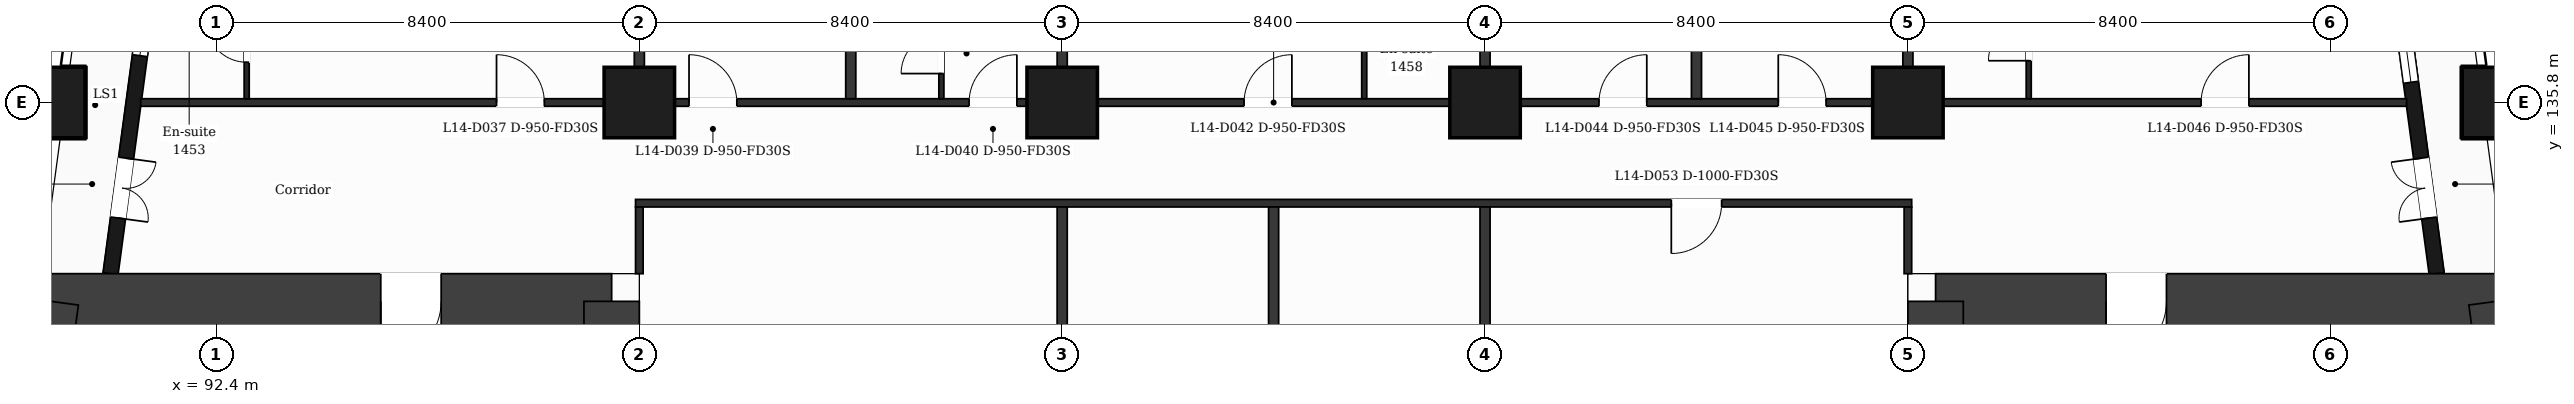
"""IFC4 building model, lengths in metres.
Left out: names, types, materials, properties, quantities, classifications, styles, units other than length and angle.
Written with IfcOpenShell. Run it as: python <this file> out.ifc"""

import sys

from ifc_helpers import new_model, si_unit, direction, frame, frame_2d, origin, origin_2d, place, context, subcontext, project, spatial, rectangle, extrude, element, fill, save


model = new_model("IFC4")
c1 = context("Model", 3, precision=1e-05, world=origin(), true_north=direction((0.0, 1.0)))
c2 = subcontext(c1, "Body", "Model", "MODEL_VIEW")
j1 = project(units=[si_unit("LENGTHUNIT", "METRE"), si_unit("PLANEANGLEUNIT", "RADIAN")], contexts=[c1])
p1 = place(None, origin())
s1 = spatial("IfcSite", under=j1, at=p1, CompositionType="ELEMENT")
p2 = place(p1, origin())
s2 = spatial("IfcBuilding", under=s1, at=p2, CompositionType="ELEMENT")
p3 = place(p2, frame((0.0, 0.0, 67.0)))
s3 = spatial("IfcBuildingStorey", under=s2, at=p3, CompositionType="ELEMENT", Elevation=67.0)
p4 = place(p3, frame((89.112, 131.85, 0.0), z_axis=(0.0, 0.0, 1.0), x_axis=(1.0, 0.0, 0.0)))
e1 = element("IfcWall", 1, at=p4, inside=s3, PredefinedType="SHEAR", context=c2, shape_type="SweptSolid", body=[
    extrude(rectangle(XDim=11.138, YDim=1.1, at=frame_2d((5.569, 0.0))), origin(), (0.0, 0.0, 1.0), 3.5),
])
p5 = place(p4, frame((6.552, 0.0, 0.0)))
e2 = element("IfcOpeningElement", 2, at=p5, cuts=e1, PredefinedType="OPENING", context=c2, shape_type="SweptSolid", body=[
    extrude(rectangle(XDim=1.2, YDim=2.1, at=frame_2d((0.6, 1.05))), frame((0.0, 0.56, 0.0), z_axis=(0.0, -1.0, 0.0), x_axis=(1.0, 0.0, 0.0)), (0.0, 0.0, 1.0), 1.12),
])
p6 = place(p3, frame((100.25, 131.85, 0.0), z_axis=(0.0, 0.0, 1.0), x_axis=(0.0, -1.0, 0.0)))
e3 = element("IfcWall", 3, at=p6, inside=s3, PredefinedType="SHEAR", context=c2, shape_type="SweptSolid", body=[
    extrude(rectangle(XDim=20.9, YDim=1.1, at=frame_2d((10.45, 0.0))), origin(), (0.0, 0.0, 1.0), 3.5),
])
p7 = place(p3, frame((86.298, 110.95, 0.0), z_axis=(0.0, 0.0, 1.0), x_axis=(0.133400422634, 0.99106222168, 0.0)))
e4 = element("IfcWall", 4, at=p7, inside=s3, PredefinedType="SHEAR", context=c2, shape_type="SweptSolid", body=[
    extrude(rectangle(XDim=21.089, YDim=1.1, at=frame_2d((10.544, 0.0))), origin(), (0.0, 0.0, 1.0), 3.5),
])
p8 = place(p3, frame((126.55, 131.85, 0.0), z_axis=(0.0, 0.0, 1.0), x_axis=(1.0, 0.0, 0.0)))
e5 = element("IfcWall", 5, at=p8, inside=s3, PredefinedType="SHEAR", context=c2, shape_type="SweptSolid", body=[
    extrude(rectangle(XDim=11.138, YDim=1.1, at=frame_2d((5.569, 0.0))), origin(), (0.0, 0.0, 1.0), 3.5),
])
p9 = place(p8, frame((3.386, 0.0, 0.0)))
e6 = element("IfcOpeningElement", 6, at=p9, cuts=e5, PredefinedType="OPENING", context=c2, shape_type="SweptSolid", body=[
    extrude(rectangle(XDim=1.2, YDim=2.1, at=frame_2d((0.6, 1.05))), frame((0.0, 0.56, 0.0), z_axis=(0.0, -1.0, 0.0), x_axis=(1.0, 0.0, 0.0)), (0.0, 0.0, 1.0), 1.12),
])
p10 = place(p3, frame((137.688, 131.85, 0.0), z_axis=(0.0, 0.0, 1.0), x_axis=(0.133411793472, -0.991060691059, 0.0)))
e7 = element("IfcWall", 7, at=p10, inside=s3, PredefinedType="SHEAR", context=c2, shape_type="SweptSolid", body=[
    extrude(rectangle(XDim=21.089, YDim=1.1, at=frame_2d((10.544, 0.0))), origin(), (0.0, 0.0, 1.0), 3.5),
])
p11 = place(p3, frame((126.55, 110.95, 0.0), z_axis=(0.0, 0.0, 1.0), x_axis=(0.0, 1.0, 0.0)))
e8 = element("IfcWall", 8, at=p11, inside=s3, PredefinedType="SHEAR", context=c2, shape_type="SweptSolid", body=[
    extrude(rectangle(XDim=20.9, YDim=1.1, at=frame_2d((10.45, 0.0))), origin(), (0.0, 0.0, 1.0), 3.5),
])
for number, where, z_axis, x_axis in (
    (9, (100.8, 135.8, 0.0), (0.0, 0.0, 1.0), (1.0, 0.0, 0.0)),
    (10, (109.2, 135.8, 0.0), (0.0, 0.0, 1.0), (1.0, 0.0, 0.0)),
    (11, (117.6, 135.8, 0.0), (0.0, 0.0, 1.0), (1.0, 0.0, 0.0)),
    (12, (126.0, 135.8, 0.0), (0.0, 0.0, 1.0), (1.0, 0.0, 0.0)),
    (13, (89.088, 135.8, 0.0), (0.0, 0.0, 1.0), (1.0, 0.0, 0.0)),
    (14, (137.711, 135.8, 0.0), (0.0, 0.0, 1.0), (1.0, 0.0, 0.0)),
):
    element("IfcColumn", number, at=place(p3, frame(where, z_axis=z_axis, x_axis=x_axis)), inside=s3, PredefinedType="COLUMN", context=c2, shape_type="SweptSolid", body=[
        extrude(rectangle(XDim=1.4, YDim=1.4, at=origin_2d()), origin(), (0.0, 0.0, 1.0), 3.5),
    ])
p12 = place(p3, frame((136.504, 132.4, 0.0), z_axis=(0.0, 0.0, 1.0), x_axis=(-0.133399697462, 0.99106231929, 0.0)))
e15 = element("IfcWall", 15, at=p12, inside=s3, PredefinedType="SOLIDWALL", context=c2, shape_type="SweptSolid", body=[
    extrude(rectangle(XDim=6.74, YDim=0.3, at=frame_2d((3.37, 0.0))), origin(), (0.0, 0.0, 1.0), 3.18),
])
p13 = place(p12, frame((1.115, 0.0, 0.0)))
e16 = element("IfcOpeningElement", 16, at=p13, cuts=e15, PredefinedType="OPENING", context=c2, shape_type="SweptSolid", body=[
    extrude(rectangle(XDim=1.2, YDim=2.4, at=frame_2d((0.6, 1.2))), frame((0.0, 0.16, 0.0), z_axis=(0.0, -1.0, 0.0), x_axis=(1.0, 0.0, 0.0)), (0.0, 0.0, 1.0), 0.32),
])
p14 = place(p12, frame((3.835, 0.0, 0.9)))
e17 = element("IfcOpeningElement", 17, at=p14, cuts=e15, PredefinedType="OPENING", context=c2, shape_type="SweptSolid", body=[
    extrude(rectangle(XDim=2.4, YDim=2.1, at=frame_2d((1.2, 1.05))), frame((0.0, 0.16, 0.0), z_axis=(0.0, -1.0, 0.0), x_axis=(1.0, 0.0, 0.0)), (0.0, 0.0, 1.0), 0.32),
])
p15 = place(p3, frame((91.177, 138.95, 0.0), z_axis=(0.0, 0.0, 1.0), x_axis=(-0.133426664613, -0.991058689065, 0.0)))
e18 = element("IfcWall", 18, at=p15, inside=s3, PredefinedType="SOLIDWALL", context=c2, shape_type="SweptSolid", body=[
    extrude(rectangle(XDim=6.609, YDim=0.3, at=frame_2d((3.305, 0.0))), origin(), (0.0, 0.0, 1.0), 3.18),
])
p16 = place(p15, frame((1.039, 0.0, 0.9)))
e19 = element("IfcOpeningElement", 19, at=p16, cuts=e18, PredefinedType="OPENING", context=c2, shape_type="SweptSolid", body=[
    extrude(rectangle(XDim=1.2, YDim=2.1, at=frame_2d((0.6, 1.05))), frame((0.0, 0.16, 0.0), z_axis=(0.0, -1.0, 0.0), x_axis=(1.0, 0.0, 0.0)), (0.0, 0.0, 1.0), 0.32),
])
p17 = place(p15, frame((4.294, 0.0, 0.0)))
e20 = element("IfcOpeningElement", 20, at=p17, cuts=e18, PredefinedType="OPENING", context=c2, shape_type="SweptSolid", body=[
    extrude(rectangle(XDim=1.2, YDim=2.4, at=frame_2d((0.6, 1.2))), frame((0.0, 0.16, 0.0), z_axis=(0.0, -1.0, 0.0), x_axis=(1.0, 0.0, 0.0)), (0.0, 0.0, 1.0), 0.32),
])
p18 = place(p3, frame((100.725, 133.8, 0.0), z_axis=(0.0, 0.0, 1.0), x_axis=(1.0, 0.0, 0.0)))
e21 = element("IfcWall", 21, at=p18, inside=s3, PredefinedType="PARTITIONING", context=c2, shape_type="SweptSolid", body=[
    extrude(rectangle(XDim=25.35, YDim=0.15, at=frame_2d((12.675, 0.0))), origin(), (0.0, 0.0, 1.0), 3.18),
])
p19 = place(p18, frame((20.575, 0.0, 0.0)))
e22 = element("IfcOpeningElement", 22, at=p19, cuts=e21, PredefinedType="OPENING", context=c2, shape_type="SweptSolid", body=[
    extrude(rectangle(XDim=1.0, YDim=2.1, at=frame_2d((0.5, 1.05))), frame((0.0, 0.085, 0.0), z_axis=(0.0, -1.0, 0.0), x_axis=(1.0, 0.0, 0.0)), (0.0, 0.0, 1.0), 0.17),
])
p20 = place(p3, frame((90.895, 135.8, 0.0), z_axis=(0.0, 0.0, 1.0), x_axis=(1.0, 0.0, 0.0)))
e23 = element("IfcWall", 23, at=p20, inside=s3, PredefinedType="PARTITIONING", context=c2, shape_type="SweptSolid", body=[
    extrude(rectangle(XDim=45.011, YDim=0.15, at=frame_2d((22.505, 0.0))), origin(), (0.0, 0.0, 1.0), 3.18),
])
p21 = place(p20, frame((7.068, 0.0, 0.0)))
e24 = element("IfcOpeningElement", 24, at=p21, cuts=e23, PredefinedType="OPENING", context=c2, shape_type="SweptSolid", body=[
    extrude(rectangle(XDim=0.95, YDim=2.1, at=frame_2d((0.475, 1.05))), frame((0.0, 0.085, 0.0), z_axis=(0.0, -1.0, 0.0), x_axis=(1.0, 0.0, 0.0)), (0.0, 0.0, 1.0), 0.17),
])
p22 = place(p20, frame((10.892, 0.0, 0.0)))
e25 = element("IfcOpeningElement", 25, at=p22, cuts=e23, PredefinedType="OPENING", context=c2, shape_type="SweptSolid", body=[
    extrude(rectangle(XDim=0.95, YDim=2.1, at=frame_2d((0.475, 1.05))), frame((0.0, 0.085, 0.0), z_axis=(0.0, -1.0, 0.0), x_axis=(1.0, 0.0, 0.0)), (0.0, 0.0, 1.0), 0.17),
])
p23 = place(p20, frame((16.455, 0.0, 0.0)))
e26 = element("IfcOpeningElement", 26, at=p23, cuts=e23, PredefinedType="OPENING", context=c2, shape_type="SweptSolid", body=[
    extrude(rectangle(XDim=0.95, YDim=2.1, at=frame_2d((0.475, 1.05))), frame((0.0, 0.085, 0.0), z_axis=(0.0, -1.0, 0.0), x_axis=(1.0, 0.0, 0.0)), (0.0, 0.0, 1.0), 0.17),
])
p24 = place(p20, frame((21.918, 0.0, 0.0)))
e27 = element("IfcOpeningElement", 27, at=p24, cuts=e23, PredefinedType="OPENING", context=c2, shape_type="SweptSolid", body=[
    extrude(rectangle(XDim=0.95, YDim=2.1, at=frame_2d((0.475, 1.05))), frame((0.0, 0.085, 0.0), z_axis=(0.0, -1.0, 0.0), x_axis=(1.0, 0.0, 0.0)), (0.0, 0.0, 1.0), 0.17),
])
p25 = place(p20, frame((28.969, 0.0, 0.0)))
e28 = element("IfcOpeningElement", 28, at=p25, cuts=e23, PredefinedType="OPENING", context=c2, shape_type="SweptSolid", body=[
    extrude(rectangle(XDim=0.95, YDim=2.1, at=frame_2d((0.475, 1.05))), frame((0.0, 0.085, 0.0), z_axis=(0.0, -1.0, 0.0), x_axis=(1.0, 0.0, 0.0)), (0.0, 0.0, 1.0), 0.17),
])
p26 = place(p20, frame((32.531, 0.0, 0.0)))
e29 = element("IfcOpeningElement", 29, at=p26, cuts=e23, PredefinedType="OPENING", context=c2, shape_type="SweptSolid", body=[
    extrude(rectangle(XDim=0.95, YDim=2.1, at=frame_2d((0.475, 1.05))), frame((0.0, 0.085, 0.0), z_axis=(0.0, -1.0, 0.0), x_axis=(1.0, 0.0, 0.0)), (0.0, 0.0, 1.0), 0.17),
])
p27 = place(p20, frame((40.929, 0.0, 0.0)))
e30 = element("IfcOpeningElement", 30, at=p27, cuts=e23, PredefinedType="OPENING", context=c2, shape_type="SweptSolid", body=[
    extrude(rectangle(XDim=0.95, YDim=2.1, at=frame_2d((0.475, 1.05))), frame((0.0, 0.085, 0.0), z_axis=(0.0, -1.0, 0.0), x_axis=(1.0, 0.0, 0.0)), (0.0, 0.0, 1.0), 0.17),
])
p28 = place(p3, frame((93.0, 135.875, 0.0), z_axis=(0.0, 0.0, 1.0), x_axis=(0.0, 1.0, 0.0)))
e31 = element("IfcWall", 31, at=p28, inside=s3, PredefinedType="PARTITIONING", context=c2, shape_type="SweptSolid", body=[
    extrude(rectangle(XDim=2.275, YDim=0.1, at=frame_2d((1.137, 0.0))), origin(), (0.0, 0.0, 1.0), 3.18),
])
p29 = place(p28, frame((0.725, 0.0, 0.0)))
e32 = element("IfcOpeningElement", 32, at=p29, cuts=e31, PredefinedType="OPENING", context=c2, shape_type="SweptSolid", body=[
    extrude(rectangle(XDim=0.8, YDim=2.1, at=frame_2d((0.4, 1.05))), frame((0.0, 0.06, 0.0), z_axis=(0.0, -1.0, 0.0), x_axis=(1.0, 0.0, 0.0)), (0.0, 0.0, 1.0), 0.12),
])
p30 = place(p3, frame((100.8, 135.875, 0.0), z_axis=(0.0, 0.0, 1.0), x_axis=(0.0, 1.0, 0.0)))
e33 = element("IfcWall", 33, at=p30, inside=s3, PredefinedType="PARTITIONING", context=c2, shape_type="SweptSolid", body=[
    extrude(rectangle(XDim=7.135, YDim=0.2, at=frame_2d((3.567, 0.0))), origin(), (0.0, 0.0, 1.0), 3.18),
])
p31 = place(p3, frame((100.8, 132.4, 0.0), z_axis=(0.0, 0.0, 1.0), x_axis=(0.0, 1.0, 0.0)))
e34 = element("IfcWall", 34, at=p31, inside=s3, PredefinedType="PARTITIONING", context=c2, shape_type="SweptSolid", body=[
    extrude(rectangle(XDim=1.325, YDim=0.15, at=frame_2d((0.663, 0.0))), origin(), (0.0, 0.0, 1.0), 3.18),
])
p32 = place(p3, frame((105.0, 135.875, 0.0), z_axis=(0.0, 0.0, 1.0), x_axis=(0.0, 1.0, 0.0)))
e35 = element("IfcWall", 35, at=p32, inside=s3, PredefinedType="PARTITIONING", context=c2, shape_type="SweptSolid", body=[
    extrude(rectangle(XDim=7.135, YDim=0.2, at=frame_2d((3.567, 0.0))), origin(), (0.0, 0.0, 1.0), 3.18),
])
p33 = place(p3, frame((106.8, 135.875, 0.0), z_axis=(0.0, 0.0, 1.0), x_axis=(0.0, 1.0, 0.0)))
e36 = element("IfcWall", 36, at=p33, inside=s3, PredefinedType="PARTITIONING", context=c2, shape_type="SweptSolid", body=[
    extrude(rectangle(XDim=2.275, YDim=0.1, at=frame_2d((1.137, 0.0))), origin(), (0.0, 0.0, 1.0), 3.18),
])
p34 = place(p33, frame((0.5, 0.0, 0.0)))
e37 = element("IfcOpeningElement", 37, at=p34, cuts=e36, PredefinedType="OPENING", context=c2, shape_type="SweptSolid", body=[
    extrude(rectangle(XDim=0.8, YDim=2.1, at=frame_2d((0.4, 1.05))), frame((0.0, 0.06, 0.0), z_axis=(0.0, -1.0, 0.0), x_axis=(1.0, 0.0, 0.0)), (0.0, 0.0, 1.0), 0.12),
])
p35 = place(p3, frame((109.2, 109.075, 0.0), z_axis=(0.0, 0.0, 1.0), x_axis=(0.0, 1.0, 0.0)))
e38 = element("IfcWall", 38, at=p35, inside=s3, PredefinedType="PARTITIONING", context=c2, shape_type="SweptSolid", body=[
    extrude(rectangle(XDim=24.65, YDim=0.2, at=frame_2d((12.325, 0.0))), origin(), (0.0, 0.0, 1.0), 3.18),
])
p36 = place(p3, frame((109.2, 135.875, 0.0), z_axis=(0.0, 0.0, 1.0), x_axis=(0.0, 1.0, 0.0)))
e39 = element("IfcWall", 39, at=p36, inside=s3, PredefinedType="PARTITIONING", context=c2, shape_type="SweptSolid", body=[
    extrude(rectangle(XDim=7.135, YDim=0.2, at=frame_2d((3.567, 0.0))), origin(), (0.0, 0.0, 1.0), 3.18),
])
p37 = place(p3, frame((113.4, 109.075, 0.0), z_axis=(0.0, 0.0, 1.0), x_axis=(0.0, 1.0, 0.0)))
e40 = element("IfcWall", 40, at=p37, inside=s3, PredefinedType="PARTITIONING", context=c2, shape_type="SweptSolid", body=[
    extrude(rectangle(XDim=24.65, YDim=0.2, at=frame_2d((12.325, 0.0))), origin(), (0.0, 0.0, 1.0), 3.18),
])
p38 = place(p3, frame((115.2, 135.875, 0.0), z_axis=(0.0, 0.0, 1.0), x_axis=(0.0, 1.0, 0.0)))
e41 = element("IfcWall", 41, at=p38, inside=s3, PredefinedType="PARTITIONING", context=c2, shape_type="SweptSolid", body=[
    extrude(rectangle(XDim=2.275, YDim=0.1, at=frame_2d((1.137, 0.0))), origin(), (0.0, 0.0, 1.0), 3.18),
])
p39 = place(p3, frame((117.6, 109.075, 0.0), z_axis=(0.0, 0.0, 1.0), x_axis=(0.0, 1.0, 0.0)))
e42 = element("IfcWall", 42, at=p39, inside=s3, PredefinedType="PARTITIONING", context=c2, shape_type="SweptSolid", body=[
    extrude(rectangle(XDim=24.65, YDim=0.2, at=frame_2d((12.325, 0.0))), origin(), (0.0, 0.0, 1.0), 3.18),
])
for number, where, z_axis, x_axis in (
    (43, (117.6, 135.875, 0.0), (0.0, 0.0, 1.0), (0.0, 1.0, 0.0)),
    (44, (121.8, 135.875, 0.0), (0.0, 0.0, 1.0), (0.0, 1.0, 0.0)),
    (45, (126.0, 135.875, 0.0), (0.0, 0.0, 1.0), (0.0, 1.0, 0.0)),
):
    element("IfcWall", number, at=place(p3, frame(where, z_axis=z_axis, x_axis=x_axis)), inside=s3, PredefinedType="PARTITIONING", context=c2, shape_type="SweptSolid", body=[
        extrude(rectangle(XDim=7.135, YDim=0.2, at=frame_2d((3.567, 0.0))), origin(), (0.0, 0.0, 1.0), 3.18),
    ])
p40 = place(p3, frame((126.0, 132.4, 0.0), z_axis=(0.0, 0.0, 1.0), x_axis=(0.0, 1.0, 0.0)))
e46 = element("IfcWall", 46, at=p40, inside=s3, PredefinedType="PARTITIONING", context=c2, shape_type="SweptSolid", body=[
    extrude(rectangle(XDim=1.325, YDim=0.15, at=frame_2d((0.663, 0.0))), origin(), (0.0, 0.0, 1.0), 3.18),
])
p41 = place(p3, frame((128.4, 135.875, 0.0), z_axis=(0.0, 0.0, 1.0), x_axis=(0.0, 1.0, 0.0)))
e47 = element("IfcWall", 47, at=p41, inside=s3, PredefinedType="PARTITIONING", context=c2, shape_type="SweptSolid", body=[
    extrude(rectangle(XDim=2.575, YDim=0.1, at=frame_2d((1.288, 0.0))), origin(), (0.0, 0.0, 1.0), 3.18),
])
p42 = place(p41, frame((0.755, 0.0, 0.0)))
e48 = element("IfcOpeningElement", 48, at=p42, cuts=e47, PredefinedType="OPENING", context=c2, shape_type="SweptSolid", body=[
    extrude(rectangle(XDim=0.8, YDim=2.1, at=frame_2d((0.4, 1.05))), frame((0.0, 0.06, 0.0), z_axis=(0.0, -1.0, 0.0), x_axis=(1.0, 0.0, 0.0)), (0.0, 0.0, 1.0), 0.12),
])
p43 = place(p13, origin())
e49 = element("IfcDoor", 49, at=p43, inside=s3, OperationType="DOUBLE_DOOR_SINGLE_SWING", PredefinedType="DOOR", context=c2, shape_type="SweptSolid", body=[
    extrude(rectangle(XDim=1.2, YDim=2.4, at=frame_2d((0.6, 1.2))), frame((0.0, 0.025, 0.0), z_axis=(0.0, -1.0, 0.0), x_axis=(1.0, 0.0, 0.0)), (0.0, 0.0, 1.0), 0.05),
])
fill(e16, e49)
p44 = place(p14, origin())
e50 = element("IfcWindow", 50, at=p44, inside=s3, PartitioningType="SINGLE_PANEL", PredefinedType="WINDOW", context=c2, shape_type="SweptSolid", body=[
    extrude(rectangle(XDim=2.4, YDim=2.1, at=frame_2d((1.2, 1.05))), frame((0.0, 0.03, 0.0), z_axis=(0.0, -1.0, 0.0), x_axis=(1.0, 0.0, 0.0)), (0.0, 0.0, 1.0), 0.06),
])
fill(e17, e50)
p45 = place(p16, origin())
e51 = element("IfcWindow", 51, at=p45, inside=s3, PartitioningType="SINGLE_PANEL", PredefinedType="WINDOW", context=c2, shape_type="SweptSolid", body=[
    extrude(rectangle(XDim=1.2, YDim=2.1, at=frame_2d((0.6, 1.05))), frame((0.0, 0.03, 0.0), z_axis=(0.0, -1.0, 0.0), x_axis=(1.0, 0.0, 0.0)), (0.0, 0.0, 1.0), 0.06),
])
fill(e19, e51)
p46 = place(p17, origin())
e52 = element("IfcDoor", 52, at=p46, inside=s3, OperationType="DOUBLE_DOOR_SINGLE_SWING", PredefinedType="DOOR", context=c2, shape_type="SweptSolid", body=[
    extrude(rectangle(XDim=1.2, YDim=2.4, at=frame_2d((0.6, 1.2))), frame((0.0, 0.025, 0.0), z_axis=(0.0, -1.0, 0.0), x_axis=(1.0, 0.0, 0.0)), (0.0, 0.0, 1.0), 0.05),
])
fill(e20, e52)
p47 = place(p21, origin())
e53 = element("IfcDoor", 53, at=p47, inside=s3, OperationType="SINGLE_SWING_LEFT", PredefinedType="DOOR", context=c2, shape_type="SweptSolid", body=[
    extrude(rectangle(XDim=0.95, YDim=2.1, at=frame_2d((0.475, 1.05))), frame((0.0, 0.025, 0.0), z_axis=(0.0, -1.0, 0.0), x_axis=(1.0, 0.0, 0.0)), (0.0, 0.0, 1.0), 0.05),
])
fill(e24, e53)
p48 = place(p29, origin())
e54 = element("IfcDoor", 54, at=p48, inside=s3, OperationType="SINGLE_SWING_RIGHT", PredefinedType="DOOR", context=c2, shape_type="SweptSolid", body=[
    extrude(rectangle(XDim=0.8, YDim=2.1, at=frame_2d((0.4, 1.05))), frame((0.0, 0.025, 0.0), z_axis=(0.0, -1.0, 0.0), x_axis=(1.0, 0.0, 0.0)), (0.0, 0.0, 1.0), 0.05),
])
fill(e32, e54)
p49 = place(p22, origin())
e55 = element("IfcDoor", 55, at=p49, inside=s3, OperationType="SINGLE_SWING_LEFT", PredefinedType="DOOR", context=c2, shape_type="SweptSolid", body=[
    extrude(rectangle(XDim=0.95, YDim=2.1, at=frame_2d((0.475, 1.05))), frame((0.0, 0.025, 0.0), z_axis=(0.0, -1.0, 0.0), x_axis=(1.0, 0.0, 0.0)), (0.0, 0.0, 1.0), 0.05),
])
fill(e25, e55)
p50 = place(p23, origin())
e56 = element("IfcDoor", 56, at=p50, inside=s3, OperationType="SINGLE_SWING_RIGHT", PredefinedType="DOOR", context=c2, shape_type="SweptSolid", body=[
    extrude(rectangle(XDim=0.95, YDim=2.1, at=frame_2d((0.475, 1.05))), frame((0.0, 0.025, 0.0), z_axis=(0.0, -1.0, 0.0), x_axis=(1.0, 0.0, 0.0)), (0.0, 0.0, 1.0), 0.05),
])
fill(e26, e56)
p51 = place(p34, origin())
e57 = element("IfcDoor", 57, at=p51, inside=s3, OperationType="SINGLE_SWING_LEFT", PredefinedType="DOOR", context=c2, shape_type="SweptSolid", body=[
    extrude(rectangle(XDim=0.8, YDim=2.1, at=frame_2d((0.4, 1.05))), frame((0.0, 0.025, 0.0), z_axis=(0.0, -1.0, 0.0), x_axis=(1.0, 0.0, 0.0)), (0.0, 0.0, 1.0), 0.05),
])
fill(e37, e57)
p52 = place(p24, origin())
e58 = element("IfcDoor", 58, at=p52, inside=s3, OperationType="SINGLE_SWING_RIGHT", PredefinedType="DOOR", context=c2, shape_type="SweptSolid", body=[
    extrude(rectangle(XDim=0.95, YDim=2.1, at=frame_2d((0.475, 1.05))), frame((0.0, 0.025, 0.0), z_axis=(0.0, -1.0, 0.0), x_axis=(1.0, 0.0, 0.0)), (0.0, 0.0, 1.0), 0.05),
])
fill(e27, e58)
p53 = place(p25, origin())
e59 = element("IfcDoor", 59, at=p53, inside=s3, OperationType="SINGLE_SWING_RIGHT", PredefinedType="DOOR", context=c2, shape_type="SweptSolid", body=[
    extrude(rectangle(XDim=0.95, YDim=2.1, at=frame_2d((0.475, 1.05))), frame((0.0, 0.025, 0.0), z_axis=(0.0, -1.0, 0.0), x_axis=(1.0, 0.0, 0.0)), (0.0, 0.0, 1.0), 0.05),
])
fill(e28, e59)
p54 = place(p26, origin())
e60 = element("IfcDoor", 60, at=p54, inside=s3, OperationType="SINGLE_SWING_LEFT", PredefinedType="DOOR", context=c2, shape_type="SweptSolid", body=[
    extrude(rectangle(XDim=0.95, YDim=2.1, at=frame_2d((0.475, 1.05))), frame((0.0, 0.025, 0.0), z_axis=(0.0, -1.0, 0.0), x_axis=(1.0, 0.0, 0.0)), (0.0, 0.0, 1.0), 0.05),
])
fill(e29, e60)
p55 = place(p27, origin())
e61 = element("IfcDoor", 61, at=p55, inside=s3, OperationType="SINGLE_SWING_RIGHT", PredefinedType="DOOR", context=c2, shape_type="SweptSolid", body=[
    extrude(rectangle(XDim=0.95, YDim=2.1, at=frame_2d((0.475, 1.05))), frame((0.0, 0.025, 0.0), z_axis=(0.0, -1.0, 0.0), x_axis=(1.0, 0.0, 0.0)), (0.0, 0.0, 1.0), 0.05),
])
fill(e30, e61)
p56 = place(p42, origin())
e62 = element("IfcDoor", 62, at=p56, inside=s3, OperationType="SINGLE_SWING_LEFT", PredefinedType="DOOR", context=c2, shape_type="SweptSolid", body=[
    extrude(rectangle(XDim=0.8, YDim=2.1, at=frame_2d((0.4, 1.05))), frame((0.0, 0.025, 0.0), z_axis=(0.0, -1.0, 0.0), x_axis=(1.0, 0.0, 0.0)), (0.0, 0.0, 1.0), 0.05),
])
fill(e48, e62)
p57 = place(p19, origin())
e63 = element("IfcDoor", 63, at=p57, inside=s3, OperationType="SINGLE_SWING_LEFT", PredefinedType="DOOR", context=c2, shape_type="SweptSolid", body=[
    extrude(rectangle(XDim=1.0, YDim=2.1, at=frame_2d((0.5, 1.05))), frame((0.0, 0.025, 0.0), z_axis=(0.0, -1.0, 0.0), x_axis=(1.0, 0.0, 0.0)), (0.0, 0.0, 1.0), 0.05),
])
fill(e22, e63)
p58 = place(p5, origin())
e64 = element("IfcDoor", 64, at=p58, inside=s3, OperationType="SINGLE_SWING_LEFT", PredefinedType="DOOR", context=c2, shape_type="SweptSolid", body=[
    extrude(rectangle(XDim=1.2, YDim=2.1, at=frame_2d((0.6, 1.05))), frame((0.0, 0.025, 0.0), z_axis=(0.0, -1.0, 0.0), x_axis=(1.0, 0.0, 0.0)), (0.0, 0.0, 1.0), 0.05),
])
fill(e2, e64)
p59 = place(p9, origin())
e65 = element("IfcDoor", 65, at=p59, inside=s3, OperationType="SINGLE_SWING_LEFT", PredefinedType="DOOR", context=c2, shape_type="SweptSolid", body=[
    extrude(rectangle(XDim=1.2, YDim=2.1, at=frame_2d((0.6, 1.05))), frame((0.0, 0.025, 0.0), z_axis=(0.0, -1.0, 0.0), x_axis=(1.0, 0.0, 0.0)), (0.0, 0.0, 1.0), 0.05),
])
fill(e6, e65)
save(model, sys.argv[1])
